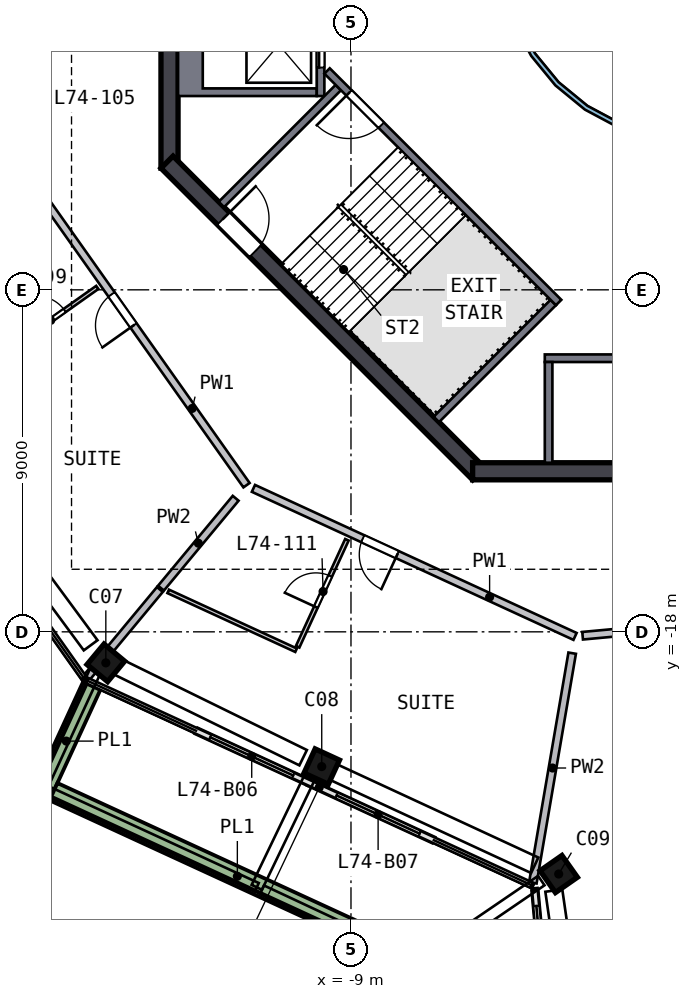
"""IFC4 building model, lengths in metres.
Left out: names, types, materials, properties, quantities, classifications, styles, units other than length and angle.
Written with IfcOpenShell. Run it as: python <this file> out.ifc"""

import sys

from ifc_helpers import new_model, si_unit, direction, frame, frame_2d, origin, origin_2d, place, context, subcontext, project, spatial, polyline, rectangle, outline, extrude, element, fill, save


model = new_model("IFC4")
c1 = context("Model", 3, precision=1e-05, world=origin(), true_north=direction((0.0, 1.0)))
c2 = subcontext(c1, "Body", "Model", "MODEL_VIEW")
j1 = project(units=[si_unit("LENGTHUNIT", "METRE"), si_unit("PLANEANGLEUNIT", "RADIAN")], contexts=[c1])
p1 = place(None, origin())
s1 = spatial("IfcSite", under=j1, at=p1, CompositionType="ELEMENT")
p2 = place(p1, origin())
s2 = spatial("IfcBuilding", under=s1, at=p2, CompositionType="ELEMENT")
p3 = place(p2, frame((0.0, 0.0, 299.5)))
s3 = spatial("IfcBuildingStorey", under=s2, at=p3, CompositionType="ELEMENT", Elevation=299.5)
p4 = place(p3, frame((-15.559, -18.728, 0.0), z_axis=(0.089627429, -0.073283156, 0.993275643), x_axis=(-0.763590768, 0.635237432, 0.115769356)))
e1 = element("IfcColumn", 1, at=p4, inside=s3, PredefinedType="COLUMN", context=c2, shape_type="SweptSolid", body=[
    extrude(rectangle(XDim=0.7, YDim=0.7, at=origin_2d()), origin(), (0.0, 0.0, 1.0), 3.211),
])
p5 = place(p3, frame((-9.894, -21.49, 0.0), z_axis=(0.102589312, -0.046237437, 0.993648596), x_axis=(0.902393906, -0.41596114, -0.11252363)))
e2 = element("IfcColumn", 2, at=p5, inside=s3, PredefinedType="COLUMN", context=c2, shape_type="SweptSolid", body=[
    extrude(rectangle(XDim=0.7, YDim=0.7, at=origin_2d()), origin(), (0.0, 0.0, 1.0), 3.21),
])
p6 = place(p3, frame((-3.675, -24.354, 0.0), z_axis=(0.115912428, -0.016493768, 0.993122482), x_axis=(-0.570122346, 0.817643617, 0.080121326)))
e3 = element("IfcColumn", 3, at=p6, inside=s3, PredefinedType="COLUMN", context=c2, shape_type="SweptSolid", body=[
    extrude(rectangle(XDim=0.7, YDim=0.7, at=origin_2d()), origin(), (0.0, 0.0, 1.0), 3.212),
])
p7 = place(p3, frame((-13.775, 5.799, 0.0), z_axis=(0.0, 0.0, 1.0), x_axis=(0.0, -1.0, 0.0)))
e4 = element("IfcWall", 4, at=p7, inside=s3, PredefinedType="SHEAR", context=c2, shape_type="SweptSolid", body=[
    extrude(rectangle(XDim=11.598, YDim=0.45, at=frame_2d((5.799, 0.0))), origin(), (0.0, 0.0, 1.0), 3.5),
])
p8 = place(p7, frame((4.899, 0.0, 0.0)))
e5 = element("IfcOpeningElement", 5, at=p8, cuts=e4, PredefinedType="OPENING", context=c2, shape_type="SweptSolid", body=[
    extrude(rectangle(XDim=1.8, YDim=2.1, at=frame_2d((0.9, 1.05))), frame((0.0, 0.235, 0.0), z_axis=(0.0, -1.0, 0.0), x_axis=(1.0, 0.0, 0.0)), (0.0, 0.0, 1.0), 0.47),
])
p9 = place(p3, frame((-13.841, -5.64, 0.0), z_axis=(0.0, 0.0, 1.0), x_axis=(0.707106781, -0.707106781, 0.0)))
e6 = element("IfcWall", 6, at=p9, inside=s3, PredefinedType="SHEAR", context=c2, shape_type="SweptSolid", body=[
    extrude(rectangle(XDim=11.598, YDim=0.45, at=frame_2d((5.799, 0.0))), origin(), (0.0, 0.0, 1.0), 3.5),
])
p10 = place(p9, frame((2.099, 0.0, 0.0)))
e7 = element("IfcOpeningElement", 7, at=p10, cuts=e6, PredefinedType="OPENING", context=c2, shape_type="SweptSolid", body=[
    extrude(rectangle(XDim=1.2, YDim=2.1, at=frame_2d((0.6, 1.05))), frame((0.0, 0.235, 0.0), z_axis=(0.0, -1.0, 0.0), x_axis=(1.0, 0.0, 0.0)), (0.0, 0.0, 1.0), 0.47),
])
p11 = place(p3, frame((-5.799, -13.775, 0.0), z_axis=(0.0, 0.0, 1.0), x_axis=(1.0, 0.0, 0.0)))
e8 = element("IfcWall", 8, at=p11, inside=s3, PredefinedType="SHEAR", context=c2, shape_type="SweptSolid", body=[
    extrude(rectangle(XDim=11.598, YDim=0.45, at=frame_2d((5.799, 0.0))), origin(), (0.0, 0.0, 1.0), 3.5),
])
p12 = place(p3, frame((-13.065, -20.608, 0.0), z_axis=(0.0, 0.0, 1.0), x_axis=(0.90835693, -0.418195752, 0.0)))
e9 = element("IfcWall", 9, at=p12, inside=s3, PredefinedType="SOLIDWALL", context=c2, shape_type="SweptSolid", body=[
    extrude(rectangle(XDim=3.25, YDim=0.15, at=frame_2d((1.625, 0.0))), origin(), (0.0, 0.0, 1.0), 2.525),
])
p13 = place(p12, frame((0.4, 0.0, 0.0)))
e10 = element("IfcOpeningElement", 10, at=p13, cuts=e9, PredefinedType="OPENING", context=c2, shape_type="SweptSolid", body=[
    extrude(rectangle(XDim=2.4, YDim=2.4, at=frame_2d((1.2, 1.2))), frame((0.0, 0.085, 0.0), z_axis=(0.0, -1.0, 0.0), x_axis=(1.0, 0.0, 0.0)), (0.0, 0.0, 1.0), 0.17),
])
p14 = place(p3, frame((-10.113, -21.967, 0.0), z_axis=(0.0, 0.0, 1.0), x_axis=(0.908376452, -0.418153346, 0.0)))
e11 = element("IfcWall", 11, at=p14, inside=s3, PredefinedType="SOLIDWALL", context=c2, shape_type="SweptSolid", body=[
    extrude(rectangle(XDim=3.611, YDim=0.15, at=frame_2d((1.806, 0.0))), origin(), (0.0, 0.0, 1.0), 2.525),
])
p15 = place(p14, frame((0.811, 0.0, 0.0)))
e12 = element("IfcOpeningElement", 12, at=p15, cuts=e11, PredefinedType="OPENING", context=c2, shape_type="SweptSolid", body=[
    extrude(rectangle(XDim=2.4, YDim=2.4, at=frame_2d((1.2, 1.2))), frame((0.0, 0.085, 0.0), z_axis=(0.0, -1.0, 0.0), x_axis=(1.0, 0.0, 0.0)), (0.0, 0.0, 1.0), 0.17),
])
p16 = place(p3, frame((-4.159, -24.816, 0.0), z_axis=(0.0, 0.0, 1.0), x_axis=(0.09201469, -0.99575765, 0.0)))
e13 = element("IfcWall", 13, at=p16, inside=s3, PredefinedType="SOLIDWALL", context=c2, shape_type="SweptSolid", body=[
    extrude(rectangle(XDim=3.2, YDim=0.15, at=frame_2d((1.6, 0.0))), origin(), (0.0, 0.0, 1.0), 2.525),
])
p17 = place(p16, frame((0.4, 0.0, 0.0)))
e14 = element("IfcOpeningElement", 14, at=p17, cuts=e13, PredefinedType="OPENING", context=c2, shape_type="SweptSolid", body=[
    extrude(rectangle(XDim=2.4, YDim=2.4, at=frame_2d((1.2, 1.2))), frame((0.0, 0.085, 0.0), z_axis=(0.0, -1.0, 0.0), x_axis=(1.0, 0.0, 0.0)), (0.0, 0.0, 1.0), 0.17),
])
p18 = place(p3, frame((-15.822, -19.423, 0.0), z_axis=(0.0, 0.0, 1.0), x_axis=(-0.418225571, -0.908343202, 0.0)))
e15 = element("IfcWall", 15, at=p18, inside=s3, PredefinedType="SOLIDWALL", context=c2, shape_type="SweptSolid", body=[
    extrude(rectangle(XDim=3.199, YDim=0.5, at=frame_2d((1.6, 0.0))), origin(), (0.0, 0.0, 1.0), 0.7),
])
p19 = place(p3, frame((-16.828, -22.206, 0.0), z_axis=(0.0, 0.0, 1.0), x_axis=(0.908360761, -0.418187431, 0.0)))
e16 = element("IfcWall", 16, at=p19, inside=s3, PredefinedType="SOLIDWALL", context=c2, shape_type="SweptSolid", body=[
    extrude(rectangle(XDim=10.653, YDim=0.5, at=frame_2d((5.326, 0.0))), origin(), (0.0, 0.0, 1.0), 0.7),
])
p20 = place(p3, origin())
e17 = element("IfcWall", 17, at=p20, inside=s3, PredefinedType="SOLIDWALL", context=c2, shape_type="SweptSolid", body=[
    extrude(outline(polyline([(-13.55, -3.9), (-13.55, -1.2), (-9.9, -1.2), (-9.9, -1.4), (-12.9, -1.4), (-12.9, -3.7), (-9.9, -3.7), (-9.9, -3.9), (-13.55, -3.9)])), origin(), (0.0, 0.0, 1.0), 3.19),
])
p21 = place(p3, frame((-9.8, -1.2, 0.0), z_axis=(0.0, 0.0, 1.0), x_axis=(0.0, -1.0, 0.0)))
e18 = element("IfcWall", 18, at=p21, inside=s3, PredefinedType="SOLIDWALL", context=c2, shape_type="SweptSolid", body=[
    extrude(rectangle(XDim=2.7, YDim=0.2, at=frame_2d((1.35, 0.0))), origin(), (0.0, 0.0, 1.0), 3.19),
])
p22 = place(p21, frame((0.75, 0.0, 0.0)))
e19 = element("IfcOpeningElement", 19, at=p22, cuts=e18, PredefinedType="OPENING", context=c2, shape_type="SweptSolid", body=[
    extrude(rectangle(XDim=1.2, YDim=2.1, at=frame_2d((0.6, 1.05))), frame((0.0, 0.11, 0.0), z_axis=(0.0, -1.0, 0.0), x_axis=(1.0, 0.0, 0.0)), (0.0, 0.0, 1.0), 0.22),
])
p23 = place(p3, frame((-3.9, -10.8, 0.0), z_axis=(0.0, 0.0, 1.0), x_axis=(1.0, 0.0, 0.0)))
e20 = element("IfcWall", 20, at=p23, inside=s3, PredefinedType="SOLIDWALL", context=c2, shape_type="SweptSolid", body=[
    extrude(rectangle(XDim=7.8, YDim=0.2, at=frame_2d((3.9, 0.0))), origin(), (0.0, 0.0, 1.0), 3.19),
])
p24 = place(p23, frame((3.45, 0.0, 0.0)))
e21 = element("IfcOpeningElement", 21, at=p24, cuts=e20, PredefinedType="OPENING", context=c2, shape_type="SweptSolid", body=[
    extrude(rectangle(XDim=0.9, YDim=2.1, at=frame_2d((0.45, 1.05))), frame((0.0, 0.11, 0.0), z_axis=(0.0, -1.0, 0.0), x_axis=(1.0, 0.0, 0.0)), (0.0, 0.0, 1.0), 0.22),
])
p25 = place(p3, frame((-3.8, -10.9, 0.0), z_axis=(0.0, 0.0, 1.0), x_axis=(0.0, -1.0, 0.0)))
e22 = element("IfcWall", 22, at=p25, inside=s3, PredefinedType="SOLIDWALL", context=c2, shape_type="SweptSolid", body=[
    extrude(rectangle(XDim=2.65, YDim=0.2, at=frame_2d((1.325, 0.0))), origin(), (0.0, 0.0, 1.0), 3.19),
])
p26 = place(p3, frame((-3.535, -9.334, 0.0), z_axis=(0.0, 0.0, 1.0), x_axis=(-0.707120946, 0.707092617, 0.0)))
e23 = element("IfcWall", 23, at=p26, inside=s3, PredefinedType="SOLIDWALL", context=c2, shape_type="SweptSolid", body=[
    extrude(rectangle(XDim=8.618, YDim=0.2, at=frame_2d((4.309, 0.0))), origin(), (0.0, 0.0, 1.0), 3.19),
])
p27 = place(p26, frame((6.6, 0.0, 0.0)))
e24 = element("IfcOpeningElement", 24, at=p27, cuts=e23, PredefinedType="OPENING", context=c2, shape_type="SweptSolid", body=[
    extrude(rectangle(XDim=1.2, YDim=2.1, at=frame_2d((0.6, 1.05))), frame((0.0, 0.11, 0.0), z_axis=(0.0, -1.0, 0.0), x_axis=(1.0, 0.0, 0.0)), (0.0, 0.0, 1.0), 0.22),
])
for number, where, z_axis, x_axis in (
    (25, (-9.334, -3.677, 0.0), (0.0, 0.0, 1.0), (-0.707, -0.707, 0.0)),
    (26, (-3.677, -9.334, 0.0), (0.0, 0.0, 1.0), (-0.707, -0.707, 0.0)),
):
    element("IfcWall", number, at=place(p3, frame(where, z_axis=z_axis, x_axis=x_axis)), inside=s3, PredefinedType="SOLIDWALL", context=c2, shape_type="SweptSolid", body=[
        extrude(rectangle(XDim=4.35, YDim=0.2, at=frame_2d((2.175, 0.0))), origin(), (0.0, 0.0, 1.0), 3.19),
    ])
p28 = place(p3, origin())
e27 = element("IfcWall", 27, at=p28, inside=s3, PredefinedType="SOLIDWALL", context=c2, shape_type="SweptSolid", body=[
    extrude(outline(polyline([(5.021, -0.999), (4.73, -1.959), (4.257, -2.844), (3.62, -3.62), (2.844, -4.257), (1.959, -4.73), (0.999, -5.021), (0.0, -5.12), (-0.999, -5.021), (-1.959, -4.73), (-2.844, -4.257), (-3.62, -3.62), (-4.257, -2.844), (-4.73, -1.959), (-5.021, -0.999), (-5.12, 0.0), (-5.021, 0.999), (-4.73, 1.959), (-4.257, 2.844), (-3.62, 3.62), (-2.844, 4.257), (-1.959, 4.73), (-0.999, 5.021), (0.0, 5.12), (0.999, 5.021), (1.959, 4.73), (2.844, 4.257), (3.62, 3.62), (4.257, 2.844), (4.73, 1.959), (5.021, 0.999), (5.12, 0.0), (5.021, -0.999)]), holes=[polyline([(4.904, 0.976), (4.619, 1.913), (4.157, 2.778), (3.535, 3.535), (2.778, 4.157), (1.913, 4.619), (0.976, 4.904), (0.0, 5.0), (-0.976, 4.904), (-1.913, 4.619), (-2.778, 4.157), (-3.535, 3.535), (-4.157, 2.778), (-4.619, 1.913), (-4.904, 0.976), (-5.0, 0.0), (-4.904, -0.976), (-4.619, -1.913), (-4.157, -2.778), (-3.535, -3.535), (-2.778, -4.157), (-1.913, -4.619), (-0.976, -4.904), (0.0, -5.0), (0.976, -4.904), (1.913, -4.619), (2.778, -4.157), (3.535, -3.535), (4.157, -2.778), (4.619, -1.913), (4.904, -0.976), (5.0, 0.0), (4.904, 0.976)])]), origin(), (0.0, 0.0, 1.0), 3.19),
])
p29 = place(p3, frame((-11.749, -14.141, 0.0), z_axis=(0.0, 0.0, 1.0), x_axis=(-0.577581016, 0.81633337, 0.0)))
e28 = element("IfcWall", 28, at=p29, inside=s3, PredefinedType="SOLIDWALL", context=c2, shape_type="SweptSolid", body=[
    extrude(rectangle(XDim=9.317, YDim=0.2, at=frame_2d((4.658, 0.0))), origin(), (0.0, 0.0, 1.0), 3.19),
])
p30 = place(p29, frame((5.15, 0.0, 0.0)))
e29 = element("IfcOpeningElement", 29, at=p30, cuts=e28, PredefinedType="OPENING", context=c2, shape_type="SweptSolid", body=[
    extrude(rectangle(XDim=1.0, YDim=2.1, at=frame_2d((0.5, 1.05))), frame((0.0, 0.11, 0.0), z_axis=(0.0, -1.0, 0.0), x_axis=(1.0, 0.0, 0.0)), (0.0, 0.0, 1.0), 0.22),
])
p31 = place(p3, frame((-3.104, -18.121, 0.0), z_axis=(0.0, 0.0, 1.0), x_axis=(-0.908365452, 0.418177241, 0.0)))
e30 = element("IfcWall", 30, at=p31, inside=s3, PredefinedType="SOLIDWALL", context=c2, shape_type="SweptSolid", body=[
    extrude(rectangle(XDim=9.317, YDim=0.2, at=frame_2d((4.658, 0.0))), origin(), (0.0, 0.0, 1.0), 3.19),
])
p32 = place(p31, frame((5.15, 0.0, 0.0)))
e31 = element("IfcOpeningElement", 31, at=p32, cuts=e30, PredefinedType="OPENING", context=c2, shape_type="SweptSolid", body=[
    extrude(rectangle(XDim=1.0, YDim=2.1, at=frame_2d((0.5, 1.05))), frame((0.0, 0.11, 0.0), z_axis=(0.0, -1.0, 0.0), x_axis=(1.0, 0.0, 0.0)), (0.0, 0.0, 1.0), 0.22),
])
p33 = place(p3, frame((6.372, -17.245, 0.0), z_axis=(0.0, 0.0, 1.0), x_axis=(-0.995756119, -0.092031251, 0.0)))
e32 = element("IfcWall", 32, at=p33, inside=s3, PredefinedType="SOLIDWALL", context=c2, shape_type="SweptSolid", body=[
    extrude(rectangle(XDim=9.317, YDim=0.2, at=frame_2d((4.658, 0.0))), origin(), (0.0, 0.0, 1.0), 3.19),
])
p34 = place(p33, frame((3.835, 0.0, 0.0)))
e33 = element("IfcOpeningElement", 33, at=p34, cuts=e32, PredefinedType="OPENING", context=c2, shape_type="SweptSolid", body=[
    extrude(rectangle(XDim=1.8, YDim=2.1, at=frame_2d((0.9, 1.05))), frame((0.0, 0.11, 0.0), z_axis=(0.0, -1.0, 0.0), x_axis=(1.0, 0.0, 0.0)), (0.0, 0.0, 1.0), 0.22),
])
p35 = place(p3, frame((-14.029, -16.885, 0.0), z_axis=(0.0, 0.0, 1.0), x_axis=(-0.63904331, -0.769170754, 0.0)))
e34 = element("IfcWall", 34, at=p35, inside=s3, PredefinedType="SOLIDWALL", context=c2, shape_type="SweptSolid", body=[
    extrude(rectangle(XDim=3.011, YDim=0.2, at=frame_2d((1.506, 0.0))), origin(), (0.0, 0.0, 1.0), 3.19),
])
p36 = place(p3, frame((-12.034, -14.485, 0.0), z_axis=(0.0, 0.0, 1.0), x_axis=(-0.639035595, -0.769177163, 0.0)))
e35 = element("IfcWall", 35, at=p36, inside=s3, PredefinedType="SOLIDWALL", context=c2, shape_type="SweptSolid", body=[
    extrude(rectangle(XDim=3.075, YDim=0.2, at=frame_2d((1.537, 0.0))), origin(), (0.0, 0.0, 1.0), 3.19),
])
p37 = place(p3, frame((-4.215, -24.606, 0.0), z_axis=(0.0, 0.0, 1.0), x_axis=(0.168845576, 0.985642517, 0.0)))
e36 = element("IfcWall", 36, at=p37, inside=s3, PredefinedType="SOLIDWALL", context=c2, shape_type="SweptSolid", body=[
    extrude(rectangle(XDim=6.132, YDim=0.2, at=frame_2d((3.066, 0.0))), origin(), (0.0, 0.0, 1.0), 3.19),
])
p38 = place(p3, frame((-18.206, -10.727, 0.0), z_axis=(0.0, 0.0, 1.0), x_axis=(0.816316916, 0.57760427, 0.0)))
e37 = element("IfcWall", 37, at=p38, inside=s3, PredefinedType="PARTITIONING", context=c2, shape_type="SweptSolid", body=[
    extrude(rectangle(XDim=3.1, YDim=0.1, at=frame_2d((1.55, 0.0))), origin(), (0.0, 0.0, 1.0), 3.19),
])
p39 = place(p38, frame((1.15, 0.0, 0.0)))
e38 = element("IfcOpeningElement", 38, at=p39, cuts=e37, PredefinedType="OPENING", context=c2, shape_type="SweptSolid", body=[
    extrude(rectangle(XDim=0.9, YDim=2.1, at=frame_2d((0.45, 1.05))), frame((0.0, 0.06, 0.0), z_axis=(0.0, -1.0, 0.0), x_axis=(1.0, 0.0, 0.0)), (0.0, 0.0, 1.0), 0.12),
])
p40 = place(p3, frame((-10.445, -18.484, 0.0), z_axis=(0.0, 0.0, 1.0), x_axis=(-0.908371796, 0.418163462, 0.0)))
e39 = element("IfcWall", 39, at=p40, inside=s3, PredefinedType="PARTITIONING", context=c2, shape_type="SweptSolid", body=[
    extrude(rectangle(XDim=3.704, YDim=0.1, at=frame_2d((1.852, 0.0))), origin(), (0.0, 0.0, 1.0), 3.19),
])
p41 = place(p3, frame((-10.404, -18.393, 0.0), z_axis=(0.0, 0.0, 1.0), x_axis=(0.418188991, 0.908360043, 0.0)))
e40 = element("IfcWall", 40, at=p41, inside=s3, PredefinedType="PARTITIONING", context=c2, shape_type="SweptSolid", body=[
    extrude(rectangle(XDim=3.1, YDim=0.1, at=frame_2d((1.55, 0.0))), origin(), (0.0, 0.0, 1.0), 3.19),
])
p42 = place(p41, frame((1.15, 0.0, 0.0)))
e41 = element("IfcOpeningElement", 41, at=p42, cuts=e40, PredefinedType="OPENING", context=c2, shape_type="SweptSolid", body=[
    extrude(rectangle(XDim=0.9, YDim=2.1, at=frame_2d((0.45, 1.05))), frame((0.0, 0.06, 0.0), z_axis=(0.0, -1.0, 0.0), x_axis=(1.0, 0.0, 0.0)), (0.0, 0.0, 1.0), 0.12),
])
p43 = place(p13, origin())
e42 = element("IfcDoor", 42, at=p43, inside=s3, OperationType="SLIDING_TO_RIGHT", PredefinedType="DOOR", context=c2, shape_type="SweptSolid", body=[
    extrude(rectangle(XDim=2.4, YDim=2.4, at=frame_2d((1.2, 1.2))), frame((0.0, 0.025, 0.0), z_axis=(0.0, -1.0, 0.0), x_axis=(1.0, 0.0, 0.0)), (0.0, 0.0, 1.0), 0.05),
])
fill(e10, e42)
p44 = place(p15, origin())
e43 = element("IfcDoor", 43, at=p44, inside=s3, OperationType="SLIDING_TO_LEFT", PredefinedType="DOOR", context=c2, shape_type="SweptSolid", body=[
    extrude(rectangle(XDim=2.4, YDim=2.4, at=frame_2d((1.2, 1.2))), frame((0.0, 0.025, 0.0), z_axis=(0.0, -1.0, 0.0), x_axis=(1.0, 0.0, 0.0)), (0.0, 0.0, 1.0), 0.05),
])
fill(e12, e43)
p45 = place(p17, origin())
e44 = element("IfcDoor", 44, at=p45, inside=s3, OperationType="SLIDING_TO_LEFT", PredefinedType="DOOR", context=c2, shape_type="SweptSolid", body=[
    extrude(rectangle(XDim=2.4, YDim=2.4, at=frame_2d((1.2, 1.2))), frame((0.0, 0.025, 0.0), z_axis=(0.0, -1.0, 0.0), x_axis=(1.0, 0.0, 0.0)), (0.0, 0.0, 1.0), 0.05),
])
fill(e14, e44)
p46 = place(p22, origin())
e45 = element("IfcDoor", 45, at=p46, inside=s3, OperationType="DOUBLE_DOOR_SLIDING", PredefinedType="DOOR", context=c2, shape_type="SweptSolid", body=[
    extrude(rectangle(XDim=1.2, YDim=2.1, at=frame_2d((0.6, 1.05))), frame((0.0, 0.025, 0.0), z_axis=(0.0, -1.0, 0.0), x_axis=(1.0, 0.0, 0.0)), (0.0, 0.0, 1.0), 0.05),
])
fill(e19, e45)
p47 = place(p27, origin())
e46 = element("IfcDoor", 46, at=p47, inside=s3, OperationType="SINGLE_SWING_RIGHT", PredefinedType="DOOR", context=c2, shape_type="SweptSolid", body=[
    extrude(rectangle(XDim=1.2, YDim=2.1, at=frame_2d((0.6, 1.05))), frame((0.0, 0.025, 0.0), z_axis=(0.0, -1.0, 0.0), x_axis=(1.0, 0.0, 0.0)), (0.0, 0.0, 1.0), 0.05),
])
fill(e24, e46)
p48 = place(p10, origin())
e47 = element("IfcDoor", 47, at=p48, inside=s3, OperationType="SINGLE_SWING_LEFT", PredefinedType="DOOR", context=c2, shape_type="SweptSolid", body=[
    extrude(rectangle(XDim=1.2, YDim=2.1, at=frame_2d((0.6, 1.05))), frame((0.0, 0.025, 0.0), z_axis=(0.0, -1.0, 0.0), x_axis=(1.0, 0.0, 0.0)), (0.0, 0.0, 1.0), 0.05),
])
fill(e7, e47)
p49 = place(p30, origin())
e48 = element("IfcDoor", 48, at=p49, inside=s3, OperationType="SINGLE_SWING_LEFT", PredefinedType="DOOR", context=c2, shape_type="SweptSolid", body=[
    extrude(rectangle(XDim=1.0, YDim=2.1, at=frame_2d((0.5, 1.05))), frame((0.0, 0.025, 0.0), z_axis=(0.0, -1.0, 0.0), x_axis=(1.0, 0.0, 0.0)), (0.0, 0.0, 1.0), 0.05),
])
fill(e29, e48)
p50 = place(p39, origin())
e49 = element("IfcDoor", 49, at=p50, inside=s3, OperationType="SINGLE_SWING_LEFT", PredefinedType="DOOR", context=c2, shape_type="SweptSolid", body=[
    extrude(rectangle(XDim=0.9, YDim=2.1, at=frame_2d((0.45, 1.05))), frame((0.0, 0.025, 0.0), z_axis=(0.0, -1.0, 0.0), x_axis=(1.0, 0.0, 0.0)), (0.0, 0.0, 1.0), 0.05),
])
fill(e38, e49)
p51 = place(p32, origin())
e50 = element("IfcDoor", 50, at=p51, inside=s3, OperationType="SINGLE_SWING_LEFT", PredefinedType="DOOR", context=c2, shape_type="SweptSolid", body=[
    extrude(rectangle(XDim=1.0, YDim=2.1, at=frame_2d((0.5, 1.05))), frame((0.0, 0.025, 0.0), z_axis=(0.0, -1.0, 0.0), x_axis=(1.0, 0.0, 0.0)), (0.0, 0.0, 1.0), 0.05),
])
fill(e31, e50)
p52 = place(p42, origin())
e51 = element("IfcDoor", 51, at=p52, inside=s3, OperationType="SINGLE_SWING_LEFT", PredefinedType="DOOR", context=c2, shape_type="SweptSolid", body=[
    extrude(rectangle(XDim=0.9, YDim=2.1, at=frame_2d((0.45, 1.05))), frame((0.0, 0.025, 0.0), z_axis=(0.0, -1.0, 0.0), x_axis=(1.0, 0.0, 0.0)), (0.0, 0.0, 1.0), 0.05),
])
fill(e41, e51)
save(model, sys.argv[1])
